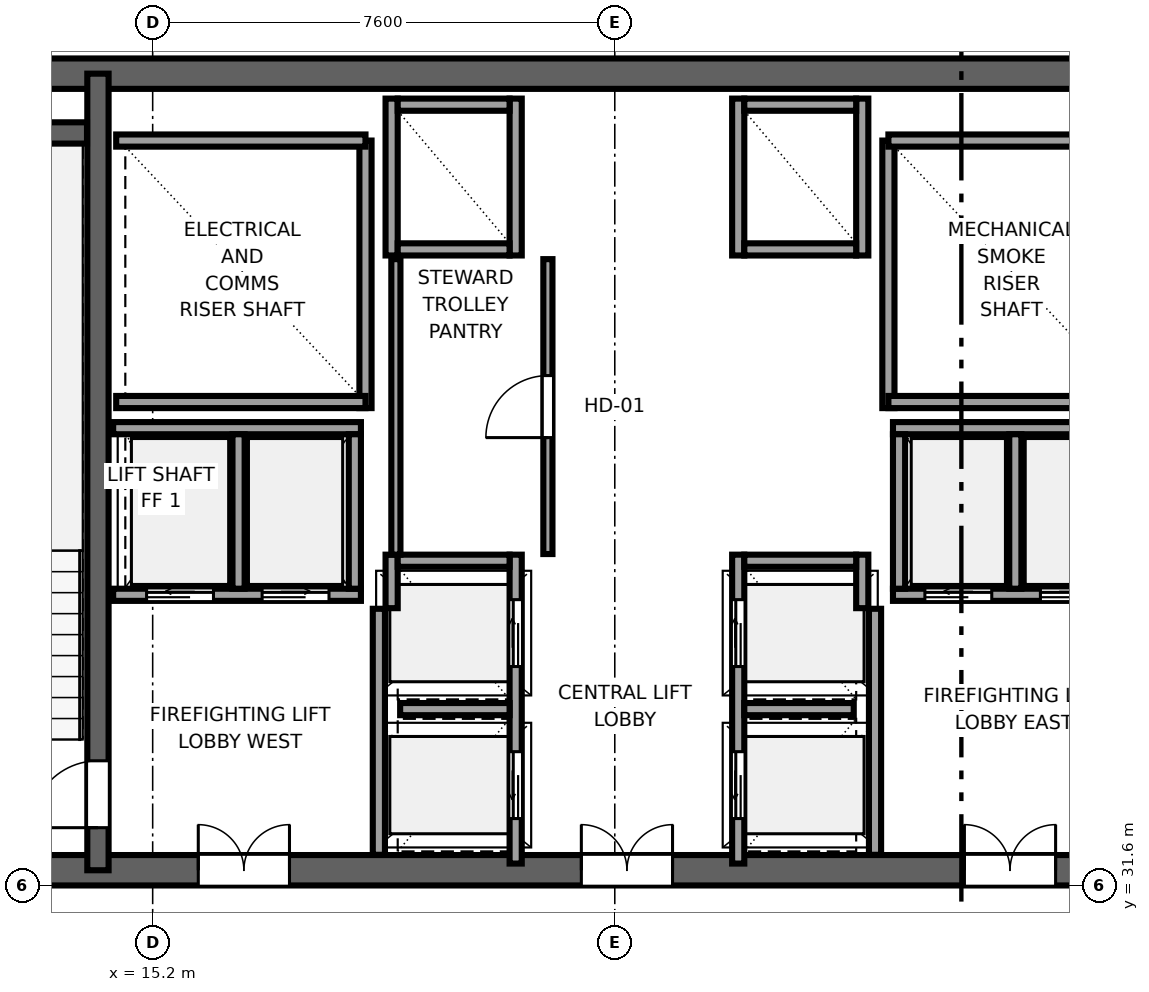
"""IFC4 building model, lengths in metres.
Left out: names, types, materials, properties, quantities, classifications, styles, units other than length and angle.
Written with IfcOpenShell. Run it as: python <this file> out.ifc"""

import sys

from ifc_helpers import new_model, si_unit, direction, frame, frame_2d, origin, place, context, subcontext, project, spatial, rectangle, extrude, source, transform, mapped, element, fill, save


model = new_model("IFC4")
c1 = context("Model", 3, precision=1e-05, world=origin(), true_north=direction((0.0, 1.0)))
c2 = subcontext(c1, "Body", "Model", "MODEL_VIEW")
j1 = project(units=[si_unit("LENGTHUNIT", "METRE"), si_unit("PLANEANGLEUNIT", "RADIAN")], contexts=[c1])
p1 = place(None, origin())
s1 = spatial("IfcSite", under=j1, at=p1, CompositionType="ELEMENT")
p2 = place(p1, origin())
s2 = spatial("IfcBuilding", under=s1, at=p2, CompositionType="ELEMENT")
p3 = place(p2, frame((0.0, 0.0, 252.3)))
s3 = spatial("IfcBuildingStorey", under=s2, at=p3, CompositionType="ELEMENT", Elevation=252.3)
p4 = place(p3, frame((10.0, 31.85, 0.0), z_axis=(0.0, 0.0, 1.0), x_axis=(1.0, 0.0, 0.0)))
e1 = element("IfcWall", 1, at=p4, inside=s3, PredefinedType="SHEAR", context=c2, shape_type="SweptSolid", body=[
    extrude(rectangle(XDim=26.0, YDim=0.5, at=frame_2d((13.0, 0.0))), origin(), (0.0, 0.0, 1.0), 3.55),
])
p5 = place(p4, frame((7.45, 0.0, 0.0), z_axis=(0.0, 0.0, 1.0), x_axis=(-1.0, 0.0, 0.0)))
e2 = element("IfcOpeningElement", 2, at=p5, cuts=e1, PredefinedType="OPENING", context=c2, shape_type="SweptSolid", body=[
    extrude(rectangle(XDim=1.5, YDim=2.04, at=frame_2d((0.75, 1.02))), frame((0.0, 0.26, 0.0), z_axis=(0.0, -1.0, 0.0), x_axis=(1.0, 0.0, 0.0)), (0.0, 0.0, 1.0), 0.52),
])
p6 = place(p4, frame((13.75, 0.0, 0.0), z_axis=(0.0, 0.0, 1.0), x_axis=(-1.0, 0.0, 0.0)))
e3 = element("IfcOpeningElement", 3, at=p6, cuts=e1, PredefinedType="OPENING", context=c2, shape_type="SweptSolid", body=[
    extrude(rectangle(XDim=1.5, YDim=2.04, at=frame_2d((0.75, 1.02))), frame((0.0, 0.26, 0.0), z_axis=(0.0, -1.0, 0.0), x_axis=(1.0, 0.0, 0.0)), (0.0, 0.0, 1.0), 0.52),
])
p7 = place(p4, frame((20.05, 0.0, 0.0), z_axis=(0.0, 0.0, 1.0), x_axis=(-1.0, 0.0, 0.0)))
e4 = element("IfcOpeningElement", 4, at=p7, cuts=e1, PredefinedType="OPENING", context=c2, shape_type="SweptSolid", body=[
    extrude(rectangle(XDim=1.5, YDim=2.04, at=frame_2d((0.75, 1.02))), frame((0.0, 0.26, 0.0), z_axis=(0.0, -1.0, 0.0), x_axis=(1.0, 0.0, 0.0)), (0.0, 0.0, 1.0), 0.52),
])
p8 = place(p3, frame((10.0, 44.95, 0.0), z_axis=(0.0, 0.0, 1.0), x_axis=(1.0, 0.0, 0.0)))
e5 = element("IfcWall", 5, at=p8, inside=s3, PredefinedType="SHEAR", context=c2, shape_type="SweptSolid", body=[
    extrude(rectangle(XDim=26.0, YDim=0.5, at=frame_2d((13.0, 0.0))), origin(), (0.0, 0.0, 1.0), 3.55),
])
p9 = place(p3, frame((14.3, 31.85, 0.0), z_axis=(0.0, 0.0, 1.0), x_axis=(0.0, 1.0, 0.0)))
e6 = element("IfcWall", 6, at=p9, inside=s3, PredefinedType="SHEAR", context=c2, shape_type="SweptSolid", body=[
    extrude(rectangle(XDim=13.1, YDim=0.35, at=frame_2d((6.55, 0.0))), origin(), (0.0, 0.0, 1.0), 3.55),
])
p10 = place(p9, frame((0.7, 0.0, 0.0)))
e7 = element("IfcOpeningElement", 7, at=p10, cuts=e6, PredefinedType="OPENING", context=c2, shape_type="SweptSolid", body=[
    extrude(rectangle(XDim=1.1, YDim=2.12, at=frame_2d((0.55, 1.06))), frame((0.0, 0.185, 0.0), z_axis=(0.0, -1.0, 0.0), x_axis=(1.0, 0.0, 0.0)), (0.0, 0.0, 1.0), 0.37),
])
p11 = place(p3, frame((10.52, 43.975, 0.0), z_axis=(0.0, 0.0, 1.0), x_axis=(1.0, 0.0, 0.0)))
e8 = element("IfcWall", 8, at=p11, inside=s3, PredefinedType="SHEAR", context=c2, shape_type="SweptSolid", body=[
    extrude(rectangle(XDim=3.6, YDim=0.35, at=frame_2d((1.8, 0.0))), origin(), (0.0, 0.0, 1.0), 3.55),
])
p12 = place(p3, frame((18.7, 39.45, 0.0), z_axis=(0.0, 0.0, 1.0), x_axis=(0.0, 1.0, 0.0)))
e9 = element("IfcWall", 9, at=p12, inside=s3, PredefinedType="SOLIDWALL", context=c2, shape_type="SweptSolid", body=[
    extrude(rectangle(XDim=4.4, YDim=0.2, at=frame_2d((2.2, 0.0))), origin(), (0.0, 0.0, 1.0), 3.37),
])
for number, where, z_axis, x_axis in (
    (10, (14.6, 39.55, 0.0), (0.0, 0.0, 1.0), (1.0, 0.0, 0.0)),
    (11, (14.6, 43.85, 0.0), (0.0, 0.0, 1.0), (1.0, 0.0, 0.0)),
):
    element("IfcWall", number, at=place(p3, frame(where, z_axis=z_axis, x_axis=x_axis)), inside=s3, PredefinedType="SOLIDWALL", context=c2, shape_type="SweptSolid", body=[
        extrude(rectangle(XDim=4.1, YDim=0.2, at=frame_2d((2.05, 0.0))), origin(), (0.0, 0.0, 1.0), 3.37),
    ])
p13 = place(p3, frame((27.3, 39.45, 0.0), z_axis=(0.0, 0.0, 1.0), x_axis=(0.0, 1.0, 0.0)))
e12 = element("IfcWall", 12, at=p13, inside=s3, PredefinedType="SOLIDWALL", context=c2, shape_type="SweptSolid", body=[
    extrude(rectangle(XDim=4.4, YDim=0.2, at=frame_2d((2.2, 0.0))), origin(), (0.0, 0.0, 1.0), 3.37),
])
for number, where, z_axis, x_axis in (
    (13, (27.3, 39.55, 0.0), (0.0, 0.0, 1.0), (1.0, 0.0, 0.0)),
    (14, (27.3, 43.85, 0.0), (0.0, 0.0, 1.0), (1.0, 0.0, 0.0)),
):
    element("IfcWall", number, at=place(p3, frame(where, z_axis=z_axis, x_axis=x_axis)), inside=s3, PredefinedType="SOLIDWALL", context=c2, shape_type="SweptSolid", body=[
        extrude(rectangle(XDim=4.1, YDim=0.2, at=frame_2d((2.05, 0.0))), origin(), (0.0, 0.0, 1.0), 3.37),
    ])
for number, where, z_axis, x_axis in (
    (15, (18.92, 32.104, 0.0), (0.0, 0.0, 1.0), (0.0, 1.0, 0.0)),
    (16, (27.08, 32.104, 0.0), (0.0, 0.0, 1.0), (0.0, 1.0, 0.0)),
):
    element("IfcWall", number, at=place(p3, frame(where, z_axis=z_axis, x_axis=x_axis)), inside=s3, PredefinedType="SOLIDWALL", context=c2, shape_type="SweptSolid", body=[
        extrude(rectangle(XDim=4.046, YDim=0.2, at=frame_2d((2.023, 0.0))), origin(), (0.0, 0.0, 1.0), 3.37),
    ])
p14 = place(p3, frame((21.17, 31.96, 0.0), z_axis=(0.0, 0.0, 1.0), x_axis=(0.0, 1.0, 0.0)))
e17 = element("IfcWall", 17, at=p14, inside=s3, PredefinedType="SOLIDWALL", context=c2, shape_type="SweptSolid", body=[
    extrude(rectangle(XDim=5.08, YDim=0.2, at=frame_2d((2.54, 0.0))), origin(), (0.0, 0.0, 1.0), 3.37),
])
p15 = place(p14, frame((0.74, 0.0, 0.0)))
e18 = element("IfcOpeningElement", 18, at=p15, cuts=e17, PredefinedType="OPENING", context=c2, shape_type="SweptSolid", body=[
    extrude(rectangle(XDim=1.1, YDim=2.12, at=frame_2d((0.55, 1.06))), frame((0.0, 0.11, 0.0), z_axis=(0.0, -1.0, 0.0), x_axis=(1.0, 0.0, 0.0)), (0.0, 0.0, 1.0), 0.22),
])
p16 = place(p14, frame((3.24, 0.0, 0.0)))
e19 = element("IfcOpeningElement", 19, at=p16, cuts=e17, PredefinedType="OPENING", context=c2, shape_type="SweptSolid", body=[
    extrude(rectangle(XDim=1.1, YDim=2.12, at=frame_2d((0.55, 1.06))), frame((0.0, 0.11, 0.0), z_axis=(0.0, -1.0, 0.0), x_axis=(1.0, 0.0, 0.0)), (0.0, 0.0, 1.0), 0.22),
])
p17 = place(p3, frame((19.13, 36.16, 0.0), z_axis=(0.0, 0.0, 1.0), x_axis=(0.0, 1.0, 0.0)))
e20 = element("IfcWall", 20, at=p17, inside=s3, PredefinedType="SOLIDWALL", context=c2, shape_type="SweptSolid", body=[
    extrude(rectangle(XDim=0.88, YDim=0.2, at=frame_2d((0.44, 0.0))), origin(), (0.0, 0.0, 1.0), 3.37),
])
p18 = place(p3, frame((19.23, 36.94, 0.0), z_axis=(0.0, 0.0, 1.0), x_axis=(1.0, 0.0, 0.0)))
e21 = element("IfcWall", 21, at=p18, inside=s3, PredefinedType="SOLIDWALL", context=c2, shape_type="SweptSolid", body=[
    extrude(rectangle(XDim=1.84, YDim=0.2, at=frame_2d((0.92, 0.0))), origin(), (0.0, 0.0, 1.0), 3.37),
])
p19 = place(p3, frame((19.27, 34.5, 0.0), z_axis=(0.0, 0.0, 1.0), x_axis=(1.0, 0.0, 0.0)))
e22 = element("IfcWall", 22, at=p19, inside=s3, PredefinedType="SOLIDWALL", context=c2, shape_type="SweptSolid", body=[
    extrude(rectangle(XDim=1.8, YDim=0.2, at=frame_2d((0.9, 0.0))), origin(), (0.0, 0.0, 1.0), 3.37),
])
for number, where, z_axis, x_axis in (
    (23, (21.17, 41.96, 0.0), (0.0, 0.0, 1.0), (0.0, 1.0, 0.0)),
    (24, (19.13, 41.96, 0.0), (0.0, 0.0, 1.0), (0.0, 1.0, 0.0)),
):
    element("IfcWall", number, at=place(p3, frame(where, z_axis=z_axis, x_axis=x_axis)), inside=s3, PredefinedType="SOLIDWALL", context=c2, shape_type="SweptSolid", body=[
        extrude(rectangle(XDim=2.58, YDim=0.2, at=frame_2d((1.29, 0.0))), origin(), (0.0, 0.0, 1.0), 3.37),
    ])
for number, where, z_axis, x_axis in (
    (25, (19.23, 42.06, 0.0), (0.0, 0.0, 1.0), (1.0, 0.0, 0.0)),
    (26, (19.23, 44.44, 0.0), (0.0, 0.0, 1.0), (1.0, 0.0, 0.0)),
):
    element("IfcWall", number, at=place(p3, frame(where, z_axis=z_axis, x_axis=x_axis)), inside=s3, PredefinedType="SOLIDWALL", context=c2, shape_type="SweptSolid", body=[
        extrude(rectangle(XDim=1.84, YDim=0.2, at=frame_2d((0.92, 0.0))), origin(), (0.0, 0.0, 1.0), 3.37),
    ])
p20 = place(p3, frame((27.375, 36.38, 0.0), z_axis=(0.0, 0.0, 1.0), x_axis=(1.0, 0.0, 0.0)))
e27 = element("IfcWall", 27, at=p20, inside=s3, PredefinedType="SOLIDWALL", context=c2, shape_type="SweptSolid", body=[
    extrude(rectangle(XDim=4.075, YDim=0.2, at=frame_2d((2.038, 0.0))), origin(), (0.0, 0.0, 1.0), 3.37),
])
p21 = place(p20, frame((0.525, 0.0, 0.0)))
e28 = element("IfcOpeningElement", 28, at=p21, cuts=e27, PredefinedType="OPENING", context=c2, shape_type="SweptSolid", body=[
    extrude(rectangle(XDim=1.1, YDim=2.12, at=frame_2d((0.55, 1.06))), frame((0.0, 0.11, 0.0), z_axis=(0.0, -1.0, 0.0), x_axis=(1.0, 0.0, 0.0)), (0.0, 0.0, 1.0), 0.22),
])
p22 = place(p20, frame((2.425, 0.0, 0.0)))
e29 = element("IfcOpeningElement", 29, at=p22, cuts=e27, PredefinedType="OPENING", context=c2, shape_type="SweptSolid", body=[
    extrude(rectangle(XDim=1.1, YDim=2.12, at=frame_2d((0.55, 1.06))), frame((0.0, 0.11, 0.0), z_axis=(0.0, -1.0, 0.0), x_axis=(1.0, 0.0, 0.0)), (0.0, 0.0, 1.0), 0.22),
])
p23 = place(p3, frame((27.375, 39.12, 0.0), z_axis=(0.0, 0.0, 1.0), x_axis=(1.0, 0.0, 0.0)))
e30 = element("IfcWall", 30, at=p23, inside=s3, PredefinedType="SOLIDWALL", context=c2, shape_type="SweptSolid", body=[
    extrude(rectangle(XDim=4.075, YDim=0.2, at=frame_2d((2.038, 0.0))), origin(), (0.0, 0.0, 1.0), 3.37),
])
for number, where, z_axis, x_axis in (
    (31, (27.475, 36.48, 0.0), (0.0, 0.0, 1.0), (0.0, 1.0, 0.0)),
    (32, (29.387, 36.48, 0.0), (0.0, 0.0, 1.0), (0.0, 1.0, 0.0)),
):
    element("IfcWall", number, at=place(p3, frame(where, z_axis=z_axis, x_axis=x_axis)), inside=s3, PredefinedType="SOLIDWALL", context=c2, shape_type="SweptSolid", body=[
        extrude(rectangle(XDim=2.54, YDim=0.2, at=frame_2d((1.27, 0.0))), origin(), (0.0, 0.0, 1.0), 3.37),
    ])
p24 = place(p3, frame((14.55, 36.38, 0.0), z_axis=(0.0, 0.0, 1.0), x_axis=(1.0, 0.0, 0.0)))
e33 = element("IfcWall", 33, at=p24, inside=s3, PredefinedType="SOLIDWALL", context=c2, shape_type="SweptSolid", body=[
    extrude(rectangle(XDim=4.075, YDim=0.2, at=frame_2d((2.038, 0.0))), origin(), (0.0, 0.0, 1.0), 3.37),
])
p25 = place(p24, frame((0.55, 0.0, 0.0)))
e34 = element("IfcOpeningElement", 34, at=p25, cuts=e33, PredefinedType="OPENING", context=c2, shape_type="SweptSolid", body=[
    extrude(rectangle(XDim=1.1, YDim=2.12, at=frame_2d((0.55, 1.06))), frame((0.0, 0.11, 0.0), z_axis=(0.0, -1.0, 0.0), x_axis=(1.0, 0.0, 0.0)), (0.0, 0.0, 1.0), 0.22),
])
p26 = place(p24, frame((2.45, 0.0, 0.0)))
e35 = element("IfcOpeningElement", 35, at=p26, cuts=e33, PredefinedType="OPENING", context=c2, shape_type="SweptSolid", body=[
    extrude(rectangle(XDim=1.1, YDim=2.12, at=frame_2d((0.55, 1.06))), frame((0.0, 0.11, 0.0), z_axis=(0.0, -1.0, 0.0), x_axis=(1.0, 0.0, 0.0)), (0.0, 0.0, 1.0), 0.22),
])
p27 = place(p3, frame((14.55, 39.12, 0.0), z_axis=(0.0, 0.0, 1.0), x_axis=(1.0, 0.0, 0.0)))
e36 = element("IfcWall", 36, at=p27, inside=s3, PredefinedType="SOLIDWALL", context=c2, shape_type="SweptSolid", body=[
    extrude(rectangle(XDim=4.075, YDim=0.2, at=frame_2d((2.038, 0.0))), origin(), (0.0, 0.0, 1.0), 3.37),
])
for number, where, z_axis, x_axis in (
    (37, (18.525, 36.48, 0.0), (0.0, 0.0, 1.0), (0.0, 1.0, 0.0)),
    (38, (16.613, 36.48, 0.0), (0.0, 0.0, 1.0), (0.0, 1.0, 0.0)),
):
    element("IfcWall", number, at=place(p3, frame(where, z_axis=z_axis, x_axis=x_axis)), inside=s3, PredefinedType="SOLIDWALL", context=c2, shape_type="SweptSolid", body=[
        extrude(rectangle(XDim=2.54, YDim=0.2, at=frame_2d((1.27, 0.0))), origin(), (0.0, 0.0, 1.0), 3.37),
    ])
p28 = place(p3, frame((24.83, 31.96, 0.0), z_axis=(0.0, 0.0, 1.0), x_axis=(0.0, 1.0, 0.0)))
e39 = element("IfcWall", 39, at=p28, inside=s3, PredefinedType="SOLIDWALL", context=c2, shape_type="SweptSolid", body=[
    extrude(rectangle(XDim=5.08, YDim=0.2, at=frame_2d((2.54, 0.0))), origin(), (0.0, 0.0, 1.0), 3.37),
])
p29 = place(p28, frame((0.74, 0.0, 0.0)))
e40 = element("IfcOpeningElement", 40, at=p29, cuts=e39, PredefinedType="OPENING", context=c2, shape_type="SweptSolid", body=[
    extrude(rectangle(XDim=1.1, YDim=2.12, at=frame_2d((0.55, 1.06))), frame((0.0, 0.11, 0.0), z_axis=(0.0, -1.0, 0.0), x_axis=(1.0, 0.0, 0.0)), (0.0, 0.0, 1.0), 0.22),
])
p30 = place(p28, frame((3.24, 0.0, 0.0)))
e41 = element("IfcOpeningElement", 41, at=p30, cuts=e39, PredefinedType="OPENING", context=c2, shape_type="SweptSolid", body=[
    extrude(rectangle(XDim=1.1, YDim=2.12, at=frame_2d((0.55, 1.06))), frame((0.0, 0.11, 0.0), z_axis=(0.0, -1.0, 0.0), x_axis=(1.0, 0.0, 0.0)), (0.0, 0.0, 1.0), 0.22),
])
p31 = place(p3, frame((26.87, 36.16, 0.0), z_axis=(0.0, 0.0, 1.0), x_axis=(0.0, 1.0, 0.0)))
e42 = element("IfcWall", 42, at=p31, inside=s3, PredefinedType="SOLIDWALL", context=c2, shape_type="SweptSolid", body=[
    extrude(rectangle(XDim=0.88, YDim=0.2, at=frame_2d((0.44, 0.0))), origin(), (0.0, 0.0, 1.0), 3.37),
])
p32 = place(p3, frame((24.93, 36.94, 0.0), z_axis=(0.0, 0.0, 1.0), x_axis=(1.0, 0.0, 0.0)))
e43 = element("IfcWall", 43, at=p32, inside=s3, PredefinedType="SOLIDWALL", context=c2, shape_type="SweptSolid", body=[
    extrude(rectangle(XDim=1.84, YDim=0.2, at=frame_2d((0.92, 0.0))), origin(), (0.0, 0.0, 1.0), 3.37),
])
p33 = place(p3, frame((24.93, 34.5, 0.0), z_axis=(0.0, 0.0, 1.0), x_axis=(1.0, 0.0, 0.0)))
e44 = element("IfcWall", 44, at=p33, inside=s3, PredefinedType="SOLIDWALL", context=c2, shape_type="SweptSolid", body=[
    extrude(rectangle(XDim=1.8, YDim=0.2, at=frame_2d((0.9, 0.0))), origin(), (0.0, 0.0, 1.0), 3.37),
])
for number, where, z_axis, x_axis in (
    (45, (24.83, 41.96, 0.0), (0.0, 0.0, 1.0), (0.0, 1.0, 0.0)),
    (46, (26.87, 41.96, 0.0), (0.0, 0.0, 1.0), (0.0, 1.0, 0.0)),
):
    element("IfcWall", number, at=place(p3, frame(where, z_axis=z_axis, x_axis=x_axis)), inside=s3, PredefinedType="SOLIDWALL", context=c2, shape_type="SweptSolid", body=[
        extrude(rectangle(XDim=2.58, YDim=0.2, at=frame_2d((1.29, 0.0))), origin(), (0.0, 0.0, 1.0), 3.37),
    ])
for number, where, z_axis, x_axis in (
    (47, (24.93, 42.06, 0.0), (0.0, 0.0, 1.0), (1.0, 0.0, 0.0)),
    (48, (24.93, 44.44, 0.0), (0.0, 0.0, 1.0), (1.0, 0.0, 0.0)),
):
    element("IfcWall", number, at=place(p3, frame(where, z_axis=z_axis, x_axis=x_axis)), inside=s3, PredefinedType="SOLIDWALL", context=c2, shape_type="SweptSolid", body=[
        extrude(rectangle(XDim=1.84, YDim=0.2, at=frame_2d((0.92, 0.0))), origin(), (0.0, 0.0, 1.0), 3.37),
    ])
p34 = place(p3, frame((21.7, 37.05, 0.0), z_axis=(0.0, 0.0, 1.0), x_axis=(0.0, 1.0, 0.0)))
e49 = element("IfcWall", 49, at=p34, inside=s3, PredefinedType="PARTITIONING", context=c2, shape_type="SweptSolid", body=[
    extrude(rectangle(XDim=4.85, YDim=0.15, at=frame_2d((2.425, 0.0))), origin(), (0.0, 0.0, 1.0), 3.37),
])
p35 = place(p34, frame((1.915, 0.0, 0.0)))
e50 = element("IfcOpeningElement", 50, at=p35, cuts=e49, PredefinedType="OPENING", context=c2, shape_type="SweptSolid", body=[
    extrude(rectangle(XDim=1.02, YDim=2.03, at=frame_2d((0.51, 1.015))), frame((0.0, 0.085, 0.0), z_axis=(0.0, -1.0, 0.0), x_axis=(1.0, 0.0, 0.0)), (0.0, 0.0, 1.0), 0.17),
])
p36 = place(p3, frame((19.2, 37.04, 0.0), z_axis=(0.0, 0.0, 1.0), x_axis=(0.0, 1.0, 0.0)))
e51 = element("IfcWall", 51, at=p36, inside=s3, PredefinedType="PARTITIONING", context=c2, shape_type="SweptSolid", body=[
    extrude(rectangle(XDim=4.86, YDim=0.15, at=frame_2d((2.43, 0.0))), origin(), (0.0, 0.0, 1.0), 3.37),
])
m1 = source(origin(), c2, "Body", "SweptSolid", [
    extrude(rectangle(XDim=1.1, YDim=2.12, at=frame_2d((0.55, 1.06))), frame((0.0, 0.025, 0.0), z_axis=(0.0, -1.0, 0.0), x_axis=(1.0, 0.0, 0.0)), (0.0, 0.0, 1.0), 0.05),
])
p37 = place(p10, origin())
e52 = element("IfcDoor", 52, at=p37, inside=s3, OperationType="SINGLE_SWING_LEFT", PredefinedType="DOOR", context=c2, shape_type="MappedRepresentation", body=[
    mapped(m1, transform((0.0, 0.0, 0.0), x_axis=(1.0, 0.0, 0.0), y_axis=(0.0, 1.0, 0.0), z_axis=(0.0, 0.0, 1.0), scale=1.0)),
])
fill(e7, e52)
m2 = source(origin(), c2, "Body", "SweptSolid", [
    extrude(rectangle(XDim=1.5, YDim=2.04, at=frame_2d((0.75, 1.02))), frame((0.0, 0.025, 0.0), z_axis=(0.0, -1.0, 0.0), x_axis=(1.0, 0.0, 0.0)), (0.0, 0.0, 1.0), 0.05),
])
p38 = place(p5, origin())
e53 = element("IfcDoor", 53, at=p38, inside=s3, OperationType="DOUBLE_DOOR_SINGLE_SWING", PredefinedType="DOOR", context=c2, shape_type="MappedRepresentation", body=[
    mapped(m2, transform((0.0, 0.0, 0.0), x_axis=(1.0, 0.0, 0.0), y_axis=(0.0, 1.0, 0.0), z_axis=(0.0, 0.0, 1.0), scale=1.0)),
])
fill(e2, e53)
p39 = place(p6, origin())
e54 = element("IfcDoor", 54, at=p39, inside=s3, OperationType="DOUBLE_DOOR_SINGLE_SWING", PredefinedType="DOOR", context=c2, shape_type="MappedRepresentation", body=[
    mapped(m2, transform((0.0, 0.0, 0.0), x_axis=(1.0, 0.0, 0.0), y_axis=(0.0, 1.0, 0.0), z_axis=(0.0, 0.0, 1.0), scale=1.0)),
])
fill(e3, e54)
p40 = place(p7, origin())
e55 = element("IfcDoor", 55, at=p40, inside=s3, OperationType="DOUBLE_DOOR_SINGLE_SWING", PredefinedType="DOOR", context=c2, shape_type="MappedRepresentation", body=[
    mapped(m2, transform((0.0, 0.0, 0.0), x_axis=(1.0, 0.0, 0.0), y_axis=(0.0, 1.0, 0.0), z_axis=(0.0, 0.0, 1.0), scale=1.0)),
])
fill(e4, e55)
m3 = source(origin(), c2, "Body", "SweptSolid", [
    extrude(rectangle(XDim=1.1, YDim=2.12, at=frame_2d((0.55, 1.06))), frame((0.0, 0.025, 0.0), z_axis=(0.0, -1.0, 0.0), x_axis=(1.0, 0.0, 0.0)), (0.0, 0.0, 1.0), 0.05),
])
p41 = place(p15, origin())
e56 = element("IfcDoor", 56, at=p41, inside=s3, OperationType="SLIDING_TO_LEFT", PredefinedType="DOOR", context=c2, shape_type="MappedRepresentation", body=[
    mapped(m3, transform((0.0, 0.0, 0.0), x_axis=(1.0, 0.0, 0.0), y_axis=(0.0, 1.0, 0.0), z_axis=(0.0, 0.0, 1.0), scale=1.0)),
])
fill(e18, e56)
p42 = place(p16, origin())
e57 = element("IfcDoor", 57, at=p42, inside=s3, OperationType="SLIDING_TO_RIGHT", PredefinedType="DOOR", context=c2, shape_type="MappedRepresentation", body=[
    mapped(m3, transform((0.0, 0.0, 0.0), x_axis=(1.0, 0.0, 0.0), y_axis=(0.0, 1.0, 0.0), z_axis=(0.0, 0.0, 1.0), scale=1.0)),
])
fill(e19, e57)
p43 = place(p21, origin())
e58 = element("IfcDoor", 58, at=p43, inside=s3, OperationType="SLIDING_TO_LEFT", PredefinedType="DOOR", context=c2, shape_type="MappedRepresentation", body=[
    mapped(m3, transform((0.0, 0.0, 0.0), x_axis=(1.0, 0.0, 0.0), y_axis=(0.0, 1.0, 0.0), z_axis=(0.0, 0.0, 1.0), scale=1.0)),
])
fill(e28, e58)
p44 = place(p22, origin())
e59 = element("IfcDoor", 59, at=p44, inside=s3, OperationType="SLIDING_TO_RIGHT", PredefinedType="DOOR", context=c2, shape_type="MappedRepresentation", body=[
    mapped(m3, transform((0.0, 0.0, 0.0), x_axis=(1.0, 0.0, 0.0), y_axis=(0.0, 1.0, 0.0), z_axis=(0.0, 0.0, 1.0), scale=1.0)),
])
fill(e29, e59)
p45 = place(p25, origin())
e60 = element("IfcDoor", 60, at=p45, inside=s3, OperationType="SLIDING_TO_LEFT", PredefinedType="DOOR", context=c2, shape_type="MappedRepresentation", body=[
    mapped(m3, transform((0.0, 0.0, 0.0), x_axis=(1.0, 0.0, 0.0), y_axis=(0.0, 1.0, 0.0), z_axis=(0.0, 0.0, 1.0), scale=1.0)),
])
fill(e34, e60)
p46 = place(p26, origin())
e61 = element("IfcDoor", 61, at=p46, inside=s3, OperationType="SLIDING_TO_RIGHT", PredefinedType="DOOR", context=c2, shape_type="MappedRepresentation", body=[
    mapped(m3, transform((0.0, 0.0, 0.0), x_axis=(1.0, 0.0, 0.0), y_axis=(0.0, 1.0, 0.0), z_axis=(0.0, 0.0, 1.0), scale=1.0)),
])
fill(e35, e61)
p47 = place(p29, origin())
e62 = element("IfcDoor", 62, at=p47, inside=s3, OperationType="SLIDING_TO_LEFT", PredefinedType="DOOR", context=c2, shape_type="MappedRepresentation", body=[
    mapped(m3, transform((0.0, 0.0, 0.0), x_axis=(1.0, 0.0, 0.0), y_axis=(0.0, 1.0, 0.0), z_axis=(0.0, 0.0, 1.0), scale=1.0)),
])
fill(e40, e62)
p48 = place(p30, origin())
e63 = element("IfcDoor", 63, at=p48, inside=s3, OperationType="SLIDING_TO_RIGHT", PredefinedType="DOOR", context=c2, shape_type="MappedRepresentation", body=[
    mapped(m3, transform((0.0, 0.0, 0.0), x_axis=(1.0, 0.0, 0.0), y_axis=(0.0, 1.0, 0.0), z_axis=(0.0, 0.0, 1.0), scale=1.0)),
])
fill(e41, e63)
m4 = source(origin(), c2, "Body", "SweptSolid", [
    extrude(rectangle(XDim=1.02, YDim=2.03, at=frame_2d((0.51, 1.015))), frame((0.0, 0.025, 0.0), z_axis=(0.0, -1.0, 0.0), x_axis=(1.0, 0.0, 0.0)), (0.0, 0.0, 1.0), 0.05),
])
p49 = place(p35, origin())
e64 = element("IfcDoor", 64, at=p49, inside=s3, OperationType="SINGLE_SWING_LEFT", PredefinedType="DOOR", context=c2, shape_type="MappedRepresentation", body=[
    mapped(m4, transform((0.0, 0.0, 0.0), x_axis=(1.0, 0.0, 0.0), y_axis=(0.0, 1.0, 0.0), z_axis=(0.0, 0.0, 1.0), scale=1.0)),
])
fill(e50, e64)
save(model, sys.argv[1])
